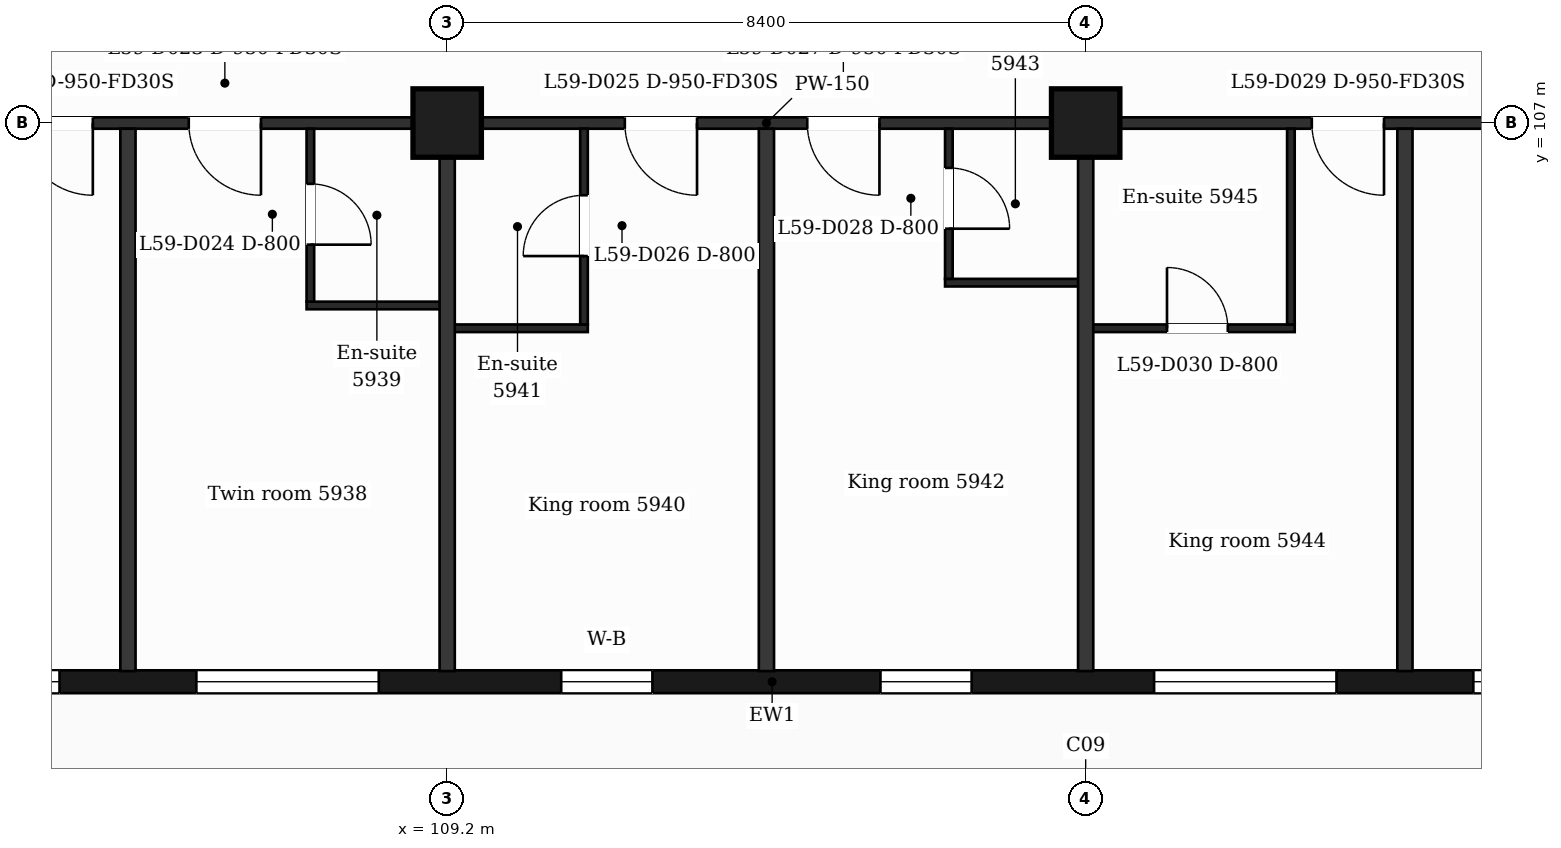
"""IFC4 building model, lengths in metres.
Left out: names, types, materials, properties, quantities, classifications, styles, units other than length and angle.
Written with IfcOpenShell. Run it as: python <this file> out.ifc"""

import sys

from ifc_helpers import new_model, si_unit, direction, frame, frame_2d, origin, origin_2d, place, context, subcontext, project, spatial, rectangle, extrude, element, fill, save


model = new_model("IFC4")
c1 = context("Model", 3, precision=1e-05, world=origin(), true_north=direction((0.0, 1.0)))
c2 = subcontext(c1, "Body", "Model", "MODEL_VIEW")
j1 = project(units=[si_unit("LENGTHUNIT", "METRE"), si_unit("PLANEANGLEUNIT", "RADIAN")], contexts=[c1])
p1 = place(None, origin())
s1 = spatial("IfcSite", under=j1, at=p1, CompositionType="ELEMENT")
p2 = place(p1, origin())
s2 = spatial("IfcBuilding", under=s1, at=p2, CompositionType="ELEMENT")
p3 = place(p2, frame((0.0, 0.0, 242.9)))
s3 = spatial("IfcBuildingStorey", under=s2, at=p3, CompositionType="ELEMENT", Elevation=242.9)
for number, where, z_axis, x_axis in (
    (1, (109.2, 107.0, 0.0), (0.0, 0.0, 1.0), (1.0, 0.0, 0.0)),
    (2, (117.6, 107.0, 0.0), (0.0, 0.0, 1.0), (1.0, 0.0, 0.0)),
):
    element("IfcColumn", number, at=place(p3, frame(where, z_axis=z_axis, x_axis=x_axis)), inside=s3, PredefinedType="COLUMN", context=c2, shape_type="SweptSolid", body=[
        extrude(rectangle(XDim=0.9, YDim=0.9, at=origin_2d()), origin(), (0.0, 0.0, 1.0), 3.7),
    ])
p4 = place(p3, frame((89.85, 99.65, 0.0), z_axis=(0.0, 0.0, 1.0), x_axis=(1.0, 0.0, 0.0)))
e3 = element("IfcWall", 3, at=p4, inside=s3, PredefinedType="SOLIDWALL", context=c2, shape_type="SweptSolid", body=[
    extrude(rectangle(XDim=47.25, YDim=0.3, at=frame_2d((23.625, 0.0))), origin(), (0.0, 0.0, 1.0), 3.2),
])
p5 = place(p4, frame((0.725, 0.0, 0.9)))
e4 = element("IfcOpeningElement", 4, at=p5, cuts=e3, PredefinedType="OPENING", context=c2, shape_type="SweptSolid", body=[
    extrude(rectangle(XDim=1.2, YDim=2.1, at=frame_2d((0.6, 1.05))), frame((0.0, 0.16, 0.0), z_axis=(0.0, -1.0, 0.0), x_axis=(1.0, 0.0, 0.0)), (0.0, 0.0, 1.0), 0.32),
])
p6 = place(p4, frame((3.45, 0.0, 0.9)))
e5 = element("IfcOpeningElement", 5, at=p6, cuts=e3, PredefinedType="OPENING", context=c2, shape_type="SweptSolid", body=[
    extrude(rectangle(XDim=2.4, YDim=2.1, at=frame_2d((1.2, 1.05))), frame((0.0, 0.16, 0.0), z_axis=(0.0, -1.0, 0.0), x_axis=(1.0, 0.0, 0.0)), (0.0, 0.0, 1.0), 0.32),
])
p7 = place(p4, frame((7.35, 0.0, 0.0)))
e6 = element("IfcOpeningElement", 6, at=p7, cuts=e3, PredefinedType="OPENING", context=c2, shape_type="SweptSolid", body=[
    extrude(rectangle(XDim=1.2, YDim=2.4, at=frame_2d((0.6, 1.2))), frame((0.0, 0.16, 0.0), z_axis=(0.0, -1.0, 0.0), x_axis=(1.0, 0.0, 0.0)), (0.0, 0.0, 1.0), 0.32),
])
p8 = place(p4, frame((9.15, 0.0, 0.9)))
e7 = element("IfcOpeningElement", 7, at=p8, cuts=e3, PredefinedType="OPENING", context=c2, shape_type="SweptSolid", body=[
    extrude(rectangle(XDim=1.2, YDim=2.1, at=frame_2d((0.6, 1.05))), frame((0.0, 0.16, 0.0), z_axis=(0.0, -1.0, 0.0), x_axis=(1.0, 0.0, 0.0)), (0.0, 0.0, 1.0), 0.32),
])
p9 = place(p4, frame((11.85, 0.0, 0.9)))
e8 = element("IfcOpeningElement", 8, at=p9, cuts=e3, PredefinedType="OPENING", context=c2, shape_type="SweptSolid", body=[
    extrude(rectangle(XDim=2.4, YDim=2.1, at=frame_2d((1.2, 1.05))), frame((0.0, 0.16, 0.0), z_axis=(0.0, -1.0, 0.0), x_axis=(1.0, 0.0, 0.0)), (0.0, 0.0, 1.0), 0.32),
])
p10 = place(p4, frame((16.05, 0.0, 0.9)))
e9 = element("IfcOpeningElement", 9, at=p10, cuts=e3, PredefinedType="OPENING", context=c2, shape_type="SweptSolid", body=[
    extrude(rectangle(XDim=2.4, YDim=2.1, at=frame_2d((1.2, 1.05))), frame((0.0, 0.16, 0.0), z_axis=(0.0, -1.0, 0.0), x_axis=(1.0, 0.0, 0.0)), (0.0, 0.0, 1.0), 0.32),
])
p11 = place(p4, frame((20.85, 0.0, 0.9)))
e10 = element("IfcOpeningElement", 10, at=p11, cuts=e3, PredefinedType="OPENING", context=c2, shape_type="SweptSolid", body=[
    extrude(rectangle(XDim=1.2, YDim=2.1, at=frame_2d((0.6, 1.05))), frame((0.0, 0.16, 0.0), z_axis=(0.0, -1.0, 0.0), x_axis=(1.0, 0.0, 0.0)), (0.0, 0.0, 1.0), 0.32),
])
p12 = place(p4, frame((25.05, 0.0, 0.9)))
e11 = element("IfcOpeningElement", 11, at=p12, cuts=e3, PredefinedType="OPENING", context=c2, shape_type="SweptSolid", body=[
    extrude(rectangle(XDim=1.2, YDim=2.1, at=frame_2d((0.6, 1.05))), frame((0.0, 0.16, 0.0), z_axis=(0.0, -1.0, 0.0), x_axis=(1.0, 0.0, 0.0)), (0.0, 0.0, 1.0), 0.32),
])
p13 = place(p4, frame((28.65, 0.0, 0.9)))
e12 = element("IfcOpeningElement", 12, at=p13, cuts=e3, PredefinedType="OPENING", context=c2, shape_type="SweptSolid", body=[
    extrude(rectangle(XDim=2.4, YDim=2.1, at=frame_2d((1.2, 1.05))), frame((0.0, 0.16, 0.0), z_axis=(0.0, -1.0, 0.0), x_axis=(1.0, 0.0, 0.0)), (0.0, 0.0, 1.0), 0.32),
])
p14 = place(p4, frame((32.85, 0.0, 0.9)))
e13 = element("IfcOpeningElement", 13, at=p14, cuts=e3, PredefinedType="OPENING", context=c2, shape_type="SweptSolid", body=[
    extrude(rectangle(XDim=2.4, YDim=2.1, at=frame_2d((1.2, 1.05))), frame((0.0, 0.16, 0.0), z_axis=(0.0, -1.0, 0.0), x_axis=(1.0, 0.0, 0.0)), (0.0, 0.0, 1.0), 0.32),
])
p15 = place(p4, frame((37.05, 0.0, 0.9)))
e14 = element("IfcOpeningElement", 14, at=p15, cuts=e3, PredefinedType="OPENING", context=c2, shape_type="SweptSolid", body=[
    extrude(rectangle(XDim=2.4, YDim=2.1, at=frame_2d((1.2, 1.05))), frame((0.0, 0.16, 0.0), z_axis=(0.0, -1.0, 0.0), x_axis=(1.0, 0.0, 0.0)), (0.0, 0.0, 1.0), 0.32),
])
p16 = place(p4, frame((41.25, 0.0, 0.9)))
e15 = element("IfcOpeningElement", 15, at=p16, cuts=e3, PredefinedType="OPENING", context=c2, shape_type="SweptSolid", body=[
    extrude(rectangle(XDim=2.4, YDim=2.1, at=frame_2d((1.2, 1.05))), frame((0.0, 0.16, 0.0), z_axis=(0.0, -1.0, 0.0), x_axis=(1.0, 0.0, 0.0)), (0.0, 0.0, 1.0), 0.32),
])
p17 = place(p4, frame((45.25, 0.0, 0.9)))
e16 = element("IfcOpeningElement", 16, at=p17, cuts=e3, PredefinedType="OPENING", context=c2, shape_type="SweptSolid", body=[
    extrude(rectangle(XDim=1.2, YDim=2.1, at=frame_2d((0.6, 1.05))), frame((0.0, 0.16, 0.0), z_axis=(0.0, -1.0, 0.0), x_axis=(1.0, 0.0, 0.0)), (0.0, 0.0, 1.0), 0.32),
])
p18 = place(p3, frame((109.2, 104.3, 0.0), z_axis=(0.0, 0.0, 1.0), x_axis=(1.0, 0.0, 0.0)))
e17 = element("IfcWall", 17, at=p18, inside=s3, PredefinedType="PARTITIONING", context=c2, shape_type="SweptSolid", body=[
    extrude(rectangle(XDim=1.85, YDim=0.1, at=frame_2d((0.925, 0.0))), origin(), (0.0, 0.0, 1.0), 3.2),
])
p19 = place(p3, frame((117.6, 104.3, 0.0), z_axis=(0.0, 0.0, 1.0), x_axis=(1.0, 0.0, 0.0)))
e18 = element("IfcWall", 18, at=p19, inside=s3, PredefinedType="PARTITIONING", context=c2, shape_type="SweptSolid", body=[
    extrude(rectangle(XDim=2.75, YDim=0.1, at=frame_2d((1.375, 0.0))), origin(), (0.0, 0.0, 1.0), 3.2),
])
p20 = place(p19, frame((1.07, 0.0, 0.0)))
e19 = element("IfcOpeningElement", 19, at=p20, cuts=e18, PredefinedType="OPENING", context=c2, shape_type="SweptSolid", body=[
    extrude(rectangle(XDim=0.8, YDim=2.1, at=frame_2d((0.4, 1.05))), frame((0.0, 0.06, 0.0), z_axis=(0.0, -1.0, 0.0), x_axis=(1.0, 0.0, 0.0)), (0.0, 0.0, 1.0), 0.12),
])
p21 = place(p3, frame((107.35, 104.6, 0.0), z_axis=(0.0, 0.0, 1.0), x_axis=(1.0, 0.0, 0.0)))
e20 = element("IfcWall", 20, at=p21, inside=s3, PredefinedType="PARTITIONING", context=c2, shape_type="SweptSolid", body=[
    extrude(rectangle(XDim=1.85, YDim=0.1, at=frame_2d((0.925, 0.0))), origin(), (0.0, 0.0, 1.0), 3.2),
])
p22 = place(p3, frame((115.75, 104.9, 0.0), z_axis=(0.0, 0.0, 1.0), x_axis=(1.0, 0.0, 0.0)))
e21 = element("IfcWall", 21, at=p22, inside=s3, PredefinedType="PARTITIONING", context=c2, shape_type="SweptSolid", body=[
    extrude(rectangle(XDim=1.85, YDim=0.1, at=frame_2d((0.925, 0.0))), origin(), (0.0, 0.0, 1.0), 3.2),
])
p23 = place(p3, frame((87.018, 107.0, 0.0), z_axis=(0.0, 0.0, 1.0), x_axis=(1.0, 0.0, 0.0)))
e22 = element("IfcWall", 22, at=p23, inside=s3, PredefinedType="PARTITIONING", context=c2, shape_type="SweptSolid", body=[
    extrude(rectangle(XDim=52.765, YDim=0.15, at=frame_2d((26.382, 0.0))), origin(), (0.0, 0.0, 1.0), 3.2),
])
p24 = place(p23, frame((0.87, 0.0, 0.0)))
e23 = element("IfcOpeningElement", 23, at=p24, cuts=e22, PredefinedType="OPENING", context=c2, shape_type="SweptSolid", body=[
    extrude(rectangle(XDim=0.95, YDim=2.1, at=frame_2d((0.475, 1.05))), frame((0.0, 0.085, 0.0), z_axis=(0.0, -1.0, 0.0), x_axis=(1.0, 0.0, 0.0)), (0.0, 0.0, 1.0), 0.17),
])
p25 = place(p23, frame((7.757, 0.0, 0.0)))
e24 = element("IfcOpeningElement", 24, at=p25, cuts=e22, PredefinedType="OPENING", context=c2, shape_type="SweptSolid", body=[
    extrude(rectangle(XDim=0.95, YDim=2.1, at=frame_2d((0.475, 1.05))), frame((0.0, 0.085, 0.0), z_axis=(0.0, -1.0, 0.0), x_axis=(1.0, 0.0, 0.0)), (0.0, 0.0, 1.0), 0.17),
])
p26 = place(p23, frame((16.57, 0.0, 0.0)))
e25 = element("IfcOpeningElement", 25, at=p26, cuts=e22, PredefinedType="OPENING", context=c2, shape_type="SweptSolid", body=[
    extrude(rectangle(XDim=0.95, YDim=2.1, at=frame_2d((0.475, 1.05))), frame((0.0, 0.085, 0.0), z_axis=(0.0, -1.0, 0.0), x_axis=(1.0, 0.0, 0.0)), (0.0, 0.0, 1.0), 0.17),
])
p27 = place(p23, frame((18.782, 0.0, 0.0)))
e26 = element("IfcOpeningElement", 26, at=p27, cuts=e22, PredefinedType="OPENING", context=c2, shape_type="SweptSolid", body=[
    extrude(rectangle(XDim=0.95, YDim=2.1, at=frame_2d((0.475, 1.05))), frame((0.0, 0.085, 0.0), z_axis=(0.0, -1.0, 0.0), x_axis=(1.0, 0.0, 0.0)), (0.0, 0.0, 1.0), 0.17),
])
p28 = place(p23, frame((24.519, 0.0, 0.0)))
e27 = element("IfcOpeningElement", 27, at=p28, cuts=e22, PredefinedType="OPENING", context=c2, shape_type="SweptSolid", body=[
    extrude(rectangle(XDim=0.95, YDim=2.1, at=frame_2d((0.475, 1.05))), frame((0.0, 0.085, 0.0), z_axis=(0.0, -1.0, 0.0), x_axis=(1.0, 0.0, 0.0)), (0.0, 0.0, 1.0), 0.17),
])
p29 = place(p23, frame((26.919, 0.0, 0.0)))
e28 = element("IfcOpeningElement", 28, at=p29, cuts=e22, PredefinedType="OPENING", context=c2, shape_type="SweptSolid", body=[
    extrude(rectangle(XDim=0.95, YDim=2.1, at=frame_2d((0.475, 1.05))), frame((0.0, 0.085, 0.0), z_axis=(0.0, -1.0, 0.0), x_axis=(1.0, 0.0, 0.0)), (0.0, 0.0, 1.0), 0.17),
])
p30 = place(p23, frame((33.557, 0.0, 0.0)))
e29 = element("IfcOpeningElement", 29, at=p30, cuts=e22, PredefinedType="OPENING", context=c2, shape_type="SweptSolid", body=[
    extrude(rectangle(XDim=0.95, YDim=2.1, at=frame_2d((0.475, 1.05))), frame((0.0, 0.085, 0.0), z_axis=(0.0, -1.0, 0.0), x_axis=(1.0, 0.0, 0.0)), (0.0, 0.0, 1.0), 0.17),
])
p31 = place(p23, frame((40.157, 0.0, 0.0)))
e30 = element("IfcOpeningElement", 30, at=p31, cuts=e22, PredefinedType="OPENING", context=c2, shape_type="SweptSolid", body=[
    extrude(rectangle(XDim=1.0, YDim=2.1, at=frame_2d((0.5, 1.05))), frame((0.0, 0.085, 0.0), z_axis=(0.0, -1.0, 0.0), x_axis=(1.0, 0.0, 0.0)), (0.0, 0.0, 1.0), 0.17),
])
p32 = place(p23, frame((48.767, 0.0, 0.0)))
e31 = element("IfcOpeningElement", 31, at=p32, cuts=e22, PredefinedType="OPENING", context=c2, shape_type="SweptSolid", body=[
    extrude(rectangle(XDim=0.95, YDim=2.1, at=frame_2d((0.475, 1.05))), frame((0.0, 0.085, 0.0), z_axis=(0.0, -1.0, 0.0), x_axis=(1.0, 0.0, 0.0)), (0.0, 0.0, 1.0), 0.17),
])
p33 = place(p3, frame((105.0, 99.79, 0.0), z_axis=(0.0, 0.0, 1.0), x_axis=(0.0, 1.0, 0.0)))
e32 = element("IfcWall", 32, at=p33, inside=s3, PredefinedType="PARTITIONING", context=c2, shape_type="SweptSolid", body=[
    extrude(rectangle(XDim=7.135, YDim=0.2, at=frame_2d((3.567, 0.0))), origin(), (0.0, 0.0, 1.0), 3.2),
])
p34 = place(p3, frame((107.4, 104.65, 0.0), z_axis=(0.0, 0.0, 1.0), x_axis=(0.0, 1.0, 0.0)))
e33 = element("IfcWall", 33, at=p34, inside=s3, PredefinedType="PARTITIONING", context=c2, shape_type="SweptSolid", body=[
    extrude(rectangle(XDim=2.275, YDim=0.1, at=frame_2d((1.138, 0.0))), origin(), (0.0, 0.0, 1.0), 3.2),
])
p35 = place(p34, frame((0.75, 0.0, 0.0)))
e34 = element("IfcOpeningElement", 34, at=p35, cuts=e33, PredefinedType="OPENING", context=c2, shape_type="SweptSolid", body=[
    extrude(rectangle(XDim=0.8, YDim=2.1, at=frame_2d((0.4, 1.05))), frame((0.0, 0.06, 0.0), z_axis=(0.0, -1.0, 0.0), x_axis=(1.0, 0.0, 0.0)), (0.0, 0.0, 1.0), 0.12),
])
p36 = place(p3, frame((109.2, 99.79, 0.0), z_axis=(0.0, 0.0, 1.0), x_axis=(0.0, 1.0, 0.0)))
e35 = element("IfcWall", 35, at=p36, inside=s3, PredefinedType="PARTITIONING", context=c2, shape_type="SweptSolid", body=[
    extrude(rectangle(XDim=7.135, YDim=0.2, at=frame_2d((3.567, 0.0))), origin(), (0.0, 0.0, 1.0), 3.2),
])
p37 = place(p3, frame((111.0, 104.35, 0.0), z_axis=(0.0, 0.0, 1.0), x_axis=(0.0, 1.0, 0.0)))
e36 = element("IfcWall", 36, at=p37, inside=s3, PredefinedType="PARTITIONING", context=c2, shape_type="SweptSolid", body=[
    extrude(rectangle(XDim=2.575, YDim=0.1, at=frame_2d((1.288, 0.0))), origin(), (0.0, 0.0, 1.0), 3.2),
])
p38 = place(p37, frame((0.9, 0.0, 0.0)))
e37 = element("IfcOpeningElement", 37, at=p38, cuts=e36, PredefinedType="OPENING", context=c2, shape_type="SweptSolid", body=[
    extrude(rectangle(XDim=0.8, YDim=2.1, at=frame_2d((0.4, 1.05))), frame((0.0, 0.06, 0.0), z_axis=(0.0, -1.0, 0.0), x_axis=(1.0, 0.0, 0.0)), (0.0, 0.0, 1.0), 0.12),
])
p39 = place(p3, frame((113.4, 99.79, 0.0), z_axis=(0.0, 0.0, 1.0), x_axis=(0.0, 1.0, 0.0)))
e38 = element("IfcWall", 38, at=p39, inside=s3, PredefinedType="PARTITIONING", context=c2, shape_type="SweptSolid", body=[
    extrude(rectangle(XDim=7.135, YDim=0.2, at=frame_2d((3.567, 0.0))), origin(), (0.0, 0.0, 1.0), 3.2),
])
p40 = place(p3, frame((115.8, 104.95, 0.0), z_axis=(0.0, 0.0, 1.0), x_axis=(0.0, 1.0, 0.0)))
e39 = element("IfcWall", 39, at=p40, inside=s3, PredefinedType="PARTITIONING", context=c2, shape_type="SweptSolid", body=[
    extrude(rectangle(XDim=1.975, YDim=0.1, at=frame_2d((0.988, 0.0))), origin(), (0.0, 0.0, 1.0), 3.2),
])
p41 = place(p40, frame((0.66, 0.0, 0.0)))
e40 = element("IfcOpeningElement", 40, at=p41, cuts=e39, PredefinedType="OPENING", context=c2, shape_type="SweptSolid", body=[
    extrude(rectangle(XDim=0.8, YDim=2.1, at=frame_2d((0.4, 1.05))), frame((0.0, 0.06, 0.0), z_axis=(0.0, -1.0, 0.0), x_axis=(1.0, 0.0, 0.0)), (0.0, 0.0, 1.0), 0.12),
])
p42 = place(p3, frame((117.6, 99.79, 0.0), z_axis=(0.0, 0.0, 1.0), x_axis=(0.0, 1.0, 0.0)))
e41 = element("IfcWall", 41, at=p42, inside=s3, PredefinedType="PARTITIONING", context=c2, shape_type="SweptSolid", body=[
    extrude(rectangle(XDim=7.135, YDim=0.2, at=frame_2d((3.567, 0.0))), origin(), (0.0, 0.0, 1.0), 3.2),
])
p43 = place(p3, frame((120.3, 104.35, 0.0), z_axis=(0.0, 0.0, 1.0), x_axis=(0.0, 1.0, 0.0)))
e42 = element("IfcWall", 42, at=p43, inside=s3, PredefinedType="PARTITIONING", context=c2, shape_type="SweptSolid", body=[
    extrude(rectangle(XDim=2.575, YDim=0.1, at=frame_2d((1.288, 0.0))), origin(), (0.0, 0.0, 1.0), 3.2),
])
p44 = place(p3, frame((121.8, 99.79, 0.0), z_axis=(0.0, 0.0, 1.0), x_axis=(0.0, 1.0, 0.0)))
e43 = element("IfcWall", 43, at=p44, inside=s3, PredefinedType="PARTITIONING", context=c2, shape_type="SweptSolid", body=[
    extrude(rectangle(XDim=7.135, YDim=0.2, at=frame_2d((3.567, 0.0))), origin(), (0.0, 0.0, 1.0), 3.2),
])
p45 = place(p9, origin())
e44 = element("IfcWindow", 44, at=p45, inside=s3, PartitioningType="SINGLE_PANEL", PredefinedType="WINDOW", context=c2, shape_type="SweptSolid", body=[
    extrude(rectangle(XDim=2.4, YDim=2.1, at=frame_2d((1.2, 1.05))), frame((0.0, 0.03, 0.0), z_axis=(0.0, -1.0, 0.0), x_axis=(1.0, 0.0, 0.0)), (0.0, 0.0, 1.0), 0.06),
])
fill(e8, e44)
p46 = place(p10, origin())
e45 = element("IfcWindow", 45, at=p46, inside=s3, PartitioningType="SINGLE_PANEL", PredefinedType="WINDOW", context=c2, shape_type="SweptSolid", body=[
    extrude(rectangle(XDim=2.4, YDim=2.1, at=frame_2d((1.2, 1.05))), frame((0.0, 0.03, 0.0), z_axis=(0.0, -1.0, 0.0), x_axis=(1.0, 0.0, 0.0)), (0.0, 0.0, 1.0), 0.06),
])
fill(e9, e45)
p47 = place(p11, origin())
e46 = element("IfcWindow", 46, at=p47, inside=s3, PartitioningType="SINGLE_PANEL", PredefinedType="WINDOW", context=c2, shape_type="SweptSolid", body=[
    extrude(rectangle(XDim=1.2, YDim=2.1, at=frame_2d((0.6, 1.05))), frame((0.0, 0.03, 0.0), z_axis=(0.0, -1.0, 0.0), x_axis=(1.0, 0.0, 0.0)), (0.0, 0.0, 1.0), 0.06),
])
fill(e10, e46)
p48 = place(p12, origin())
e47 = element("IfcWindow", 47, at=p48, inside=s3, PartitioningType="SINGLE_PANEL", PredefinedType="WINDOW", context=c2, shape_type="SweptSolid", body=[
    extrude(rectangle(XDim=1.2, YDim=2.1, at=frame_2d((0.6, 1.05))), frame((0.0, 0.03, 0.0), z_axis=(0.0, -1.0, 0.0), x_axis=(1.0, 0.0, 0.0)), (0.0, 0.0, 1.0), 0.06),
])
fill(e11, e47)
p49 = place(p13, origin())
e48 = element("IfcWindow", 48, at=p49, inside=s3, PartitioningType="SINGLE_PANEL", PredefinedType="WINDOW", context=c2, shape_type="SweptSolid", body=[
    extrude(rectangle(XDim=2.4, YDim=2.1, at=frame_2d((1.2, 1.05))), frame((0.0, 0.03, 0.0), z_axis=(0.0, -1.0, 0.0), x_axis=(1.0, 0.0, 0.0)), (0.0, 0.0, 1.0), 0.06),
])
fill(e12, e48)
p50 = place(p14, origin())
e49 = element("IfcWindow", 49, at=p50, inside=s3, PartitioningType="SINGLE_PANEL", PredefinedType="WINDOW", context=c2, shape_type="SweptSolid", body=[
    extrude(rectangle(XDim=2.4, YDim=2.1, at=frame_2d((1.2, 1.05))), frame((0.0, 0.03, 0.0), z_axis=(0.0, -1.0, 0.0), x_axis=(1.0, 0.0, 0.0)), (0.0, 0.0, 1.0), 0.06),
])
fill(e13, e49)
p51 = place(p26, origin())
e50 = element("IfcDoor", 50, at=p51, inside=s3, OperationType="SINGLE_SWING_RIGHT", PredefinedType="DOOR", context=c2, shape_type="SweptSolid", body=[
    extrude(rectangle(XDim=0.95, YDim=2.1, at=frame_2d((0.475, 1.05))), frame((0.0, 0.025, 0.0), z_axis=(0.0, -1.0, 0.0), x_axis=(1.0, 0.0, 0.0)), (0.0, 0.0, 1.0), 0.05),
])
fill(e25, e50)
p52 = place(p27, origin())
e51 = element("IfcDoor", 51, at=p52, inside=s3, OperationType="SINGLE_SWING_RIGHT", PredefinedType="DOOR", context=c2, shape_type="SweptSolid", body=[
    extrude(rectangle(XDim=0.95, YDim=2.1, at=frame_2d((0.475, 1.05))), frame((0.0, 0.025, 0.0), z_axis=(0.0, -1.0, 0.0), x_axis=(1.0, 0.0, 0.0)), (0.0, 0.0, 1.0), 0.05),
])
fill(e26, e51)
p53 = place(p35, origin())
e52 = element("IfcDoor", 52, at=p53, inside=s3, OperationType="SINGLE_SWING_LEFT", PredefinedType="DOOR", context=c2, shape_type="SweptSolid", body=[
    extrude(rectangle(XDim=0.8, YDim=2.1, at=frame_2d((0.4, 1.05))), frame((0.0, 0.025, 0.0), z_axis=(0.0, -1.0, 0.0), x_axis=(1.0, 0.0, 0.0)), (0.0, 0.0, 1.0), 0.05),
])
fill(e34, e52)
p54 = place(p28, origin())
e53 = element("IfcDoor", 53, at=p54, inside=s3, OperationType="SINGLE_SWING_RIGHT", PredefinedType="DOOR", context=c2, shape_type="SweptSolid", body=[
    extrude(rectangle(XDim=0.95, YDim=2.1, at=frame_2d((0.475, 1.05))), frame((0.0, 0.025, 0.0), z_axis=(0.0, -1.0, 0.0), x_axis=(1.0, 0.0, 0.0)), (0.0, 0.0, 1.0), 0.05),
])
fill(e27, e53)
p55 = place(p38, origin())
e54 = element("IfcDoor", 54, at=p55, inside=s3, OperationType="SINGLE_SWING_LEFT", PredefinedType="DOOR", context=c2, shape_type="SweptSolid", body=[
    extrude(rectangle(XDim=0.8, YDim=2.1, at=frame_2d((0.4, 1.05))), frame((0.0, 0.025, 0.0), z_axis=(0.0, -1.0, 0.0), x_axis=(1.0, 0.0, 0.0)), (0.0, 0.0, 1.0), 0.05),
])
fill(e37, e54)
p56 = place(p29, origin())
e55 = element("IfcDoor", 55, at=p56, inside=s3, OperationType="SINGLE_SWING_RIGHT", PredefinedType="DOOR", context=c2, shape_type="SweptSolid", body=[
    extrude(rectangle(XDim=0.95, YDim=2.1, at=frame_2d((0.475, 1.05))), frame((0.0, 0.025, 0.0), z_axis=(0.0, -1.0, 0.0), x_axis=(1.0, 0.0, 0.0)), (0.0, 0.0, 1.0), 0.05),
])
fill(e28, e55)
p57 = place(p41, origin())
e56 = element("IfcDoor", 56, at=p57, inside=s3, OperationType="SINGLE_SWING_LEFT", PredefinedType="DOOR", context=c2, shape_type="SweptSolid", body=[
    extrude(rectangle(XDim=0.8, YDim=2.1, at=frame_2d((0.4, 1.05))), frame((0.0, 0.025, 0.0), z_axis=(0.0, -1.0, 0.0), x_axis=(1.0, 0.0, 0.0)), (0.0, 0.0, 1.0), 0.05),
])
fill(e40, e56)
p58 = place(p30, origin())
e57 = element("IfcDoor", 57, at=p58, inside=s3, OperationType="SINGLE_SWING_RIGHT", PredefinedType="DOOR", context=c2, shape_type="SweptSolid", body=[
    extrude(rectangle(XDim=0.95, YDim=2.1, at=frame_2d((0.475, 1.05))), frame((0.0, 0.025, 0.0), z_axis=(0.0, -1.0, 0.0), x_axis=(1.0, 0.0, 0.0)), (0.0, 0.0, 1.0), 0.05),
])
fill(e29, e57)
p59 = place(p20, origin())
e58 = element("IfcDoor", 58, at=p59, inside=s3, OperationType="SINGLE_SWING_LEFT", PredefinedType="DOOR", context=c2, shape_type="SweptSolid", body=[
    extrude(rectangle(XDim=0.8, YDim=2.1, at=frame_2d((0.4, 1.05))), frame((0.0, 0.025, 0.0), z_axis=(0.0, -1.0, 0.0), x_axis=(1.0, 0.0, 0.0)), (0.0, 0.0, 1.0), 0.05),
])
fill(e19, e58)
save(model, sys.argv[1])
